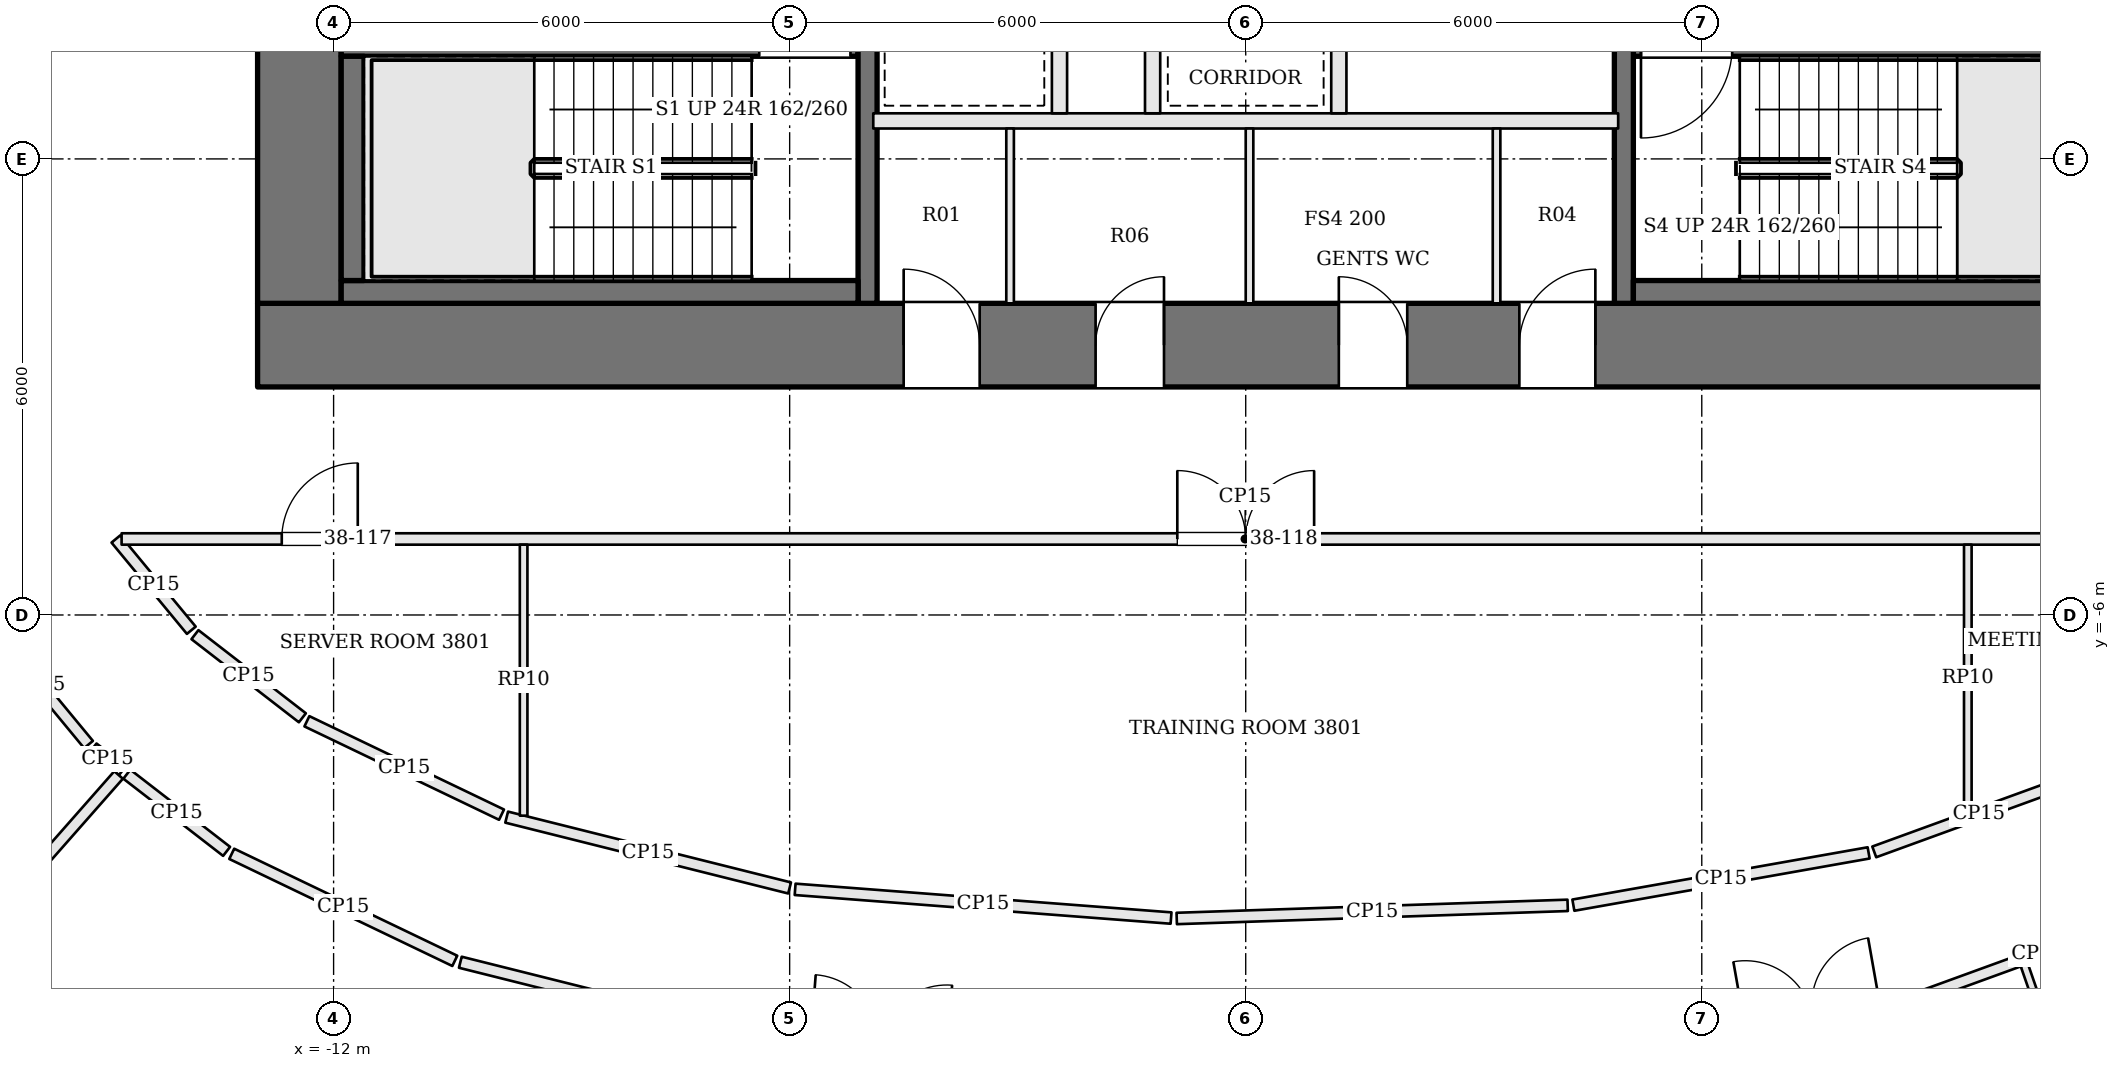
"""IFC4 building model, lengths in metres.
Left out: names, types, materials, properties, quantities, classifications, styles, units other than length and angle.
Written with IfcOpenShell. Run it as: python <this file> out.ifc"""

import sys

from ifc_helpers import new_model, si_unit, direction, frame, frame_2d, origin, place, context, subcontext, project, spatial, rectangle, extrude, element, fill, save


model = new_model("IFC4")
c1 = context("Model", 3, precision=1e-05, world=origin(), true_north=direction((0.0, 1.0)))
c2 = subcontext(c1, "Body", "Model", "MODEL_VIEW")
j1 = project(units=[si_unit("LENGTHUNIT", "METRE"), si_unit("PLANEANGLEUNIT", "RADIAN")], contexts=[c1])
p1 = place(None, origin())
s1 = spatial("IfcSite", under=j1, at=p1, CompositionType="ELEMENT")
p2 = place(p1, origin())
s2 = spatial("IfcBuilding", under=s1, at=p2, CompositionType="ELEMENT")
p3 = place(p2, frame((0.0, 0.0, 157.8)))
s3 = spatial("IfcBuildingStorey", under=s2, at=p3, CompositionType="ELEMENT", Elevation=157.8)
p4 = place(p3, frame((-13.0, -2.45, 0.0), z_axis=(0.0, 0.0, 1.0), x_axis=(1.0, 0.0, 0.0)))
e1 = element("IfcWall", 1, at=p4, inside=s3, PredefinedType="SHEAR", context=c2, shape_type="SweptSolid", body=[
    extrude(rectangle(XDim=26.0, YDim=1.1, at=frame_2d((13.0, 0.0))), origin(), (0.0, 0.0, 1.0), 3.9),
])
p5 = place(p4, frame((8.5, 0.0, 0.0)))
e2 = element("IfcOpeningElement", 2, at=p5, cuts=e1, PredefinedType="OPENING", context=c2, shape_type="SweptSolid", body=[
    extrude(rectangle(XDim=1.0, YDim=2.1, at=frame_2d((0.5, 1.05))), frame((0.0, 0.56, 0.0), z_axis=(0.0, -1.0, 0.0), x_axis=(1.0, 0.0, 0.0)), (0.0, 0.0, 1.0), 1.12),
])
p6 = place(p4, frame((11.025, 0.0, 0.0)))
e3 = element("IfcOpeningElement", 3, at=p6, cuts=e1, PredefinedType="OPENING", context=c2, shape_type="SweptSolid", body=[
    extrude(rectangle(XDim=0.9, YDim=2.1, at=frame_2d((0.45, 1.05))), frame((0.0, 0.56, 0.0), z_axis=(0.0, -1.0, 0.0), x_axis=(1.0, 0.0, 0.0)), (0.0, 0.0, 1.0), 1.12),
])
p7 = place(p4, frame((14.225, 0.0, 0.0)))
e4 = element("IfcOpeningElement", 4, at=p7, cuts=e1, PredefinedType="OPENING", context=c2, shape_type="SweptSolid", body=[
    extrude(rectangle(XDim=0.9, YDim=2.1, at=frame_2d((0.45, 1.05))), frame((0.0, 0.56, 0.0), z_axis=(0.0, -1.0, 0.0), x_axis=(1.0, 0.0, 0.0)), (0.0, 0.0, 1.0), 1.12),
])
p8 = place(p4, frame((16.6, 0.0, 0.0)))
e5 = element("IfcOpeningElement", 5, at=p8, cuts=e1, PredefinedType="OPENING", context=c2, shape_type="SweptSolid", body=[
    extrude(rectangle(XDim=1.0, YDim=2.1, at=frame_2d((0.5, 1.05))), frame((0.0, 0.56, 0.0), z_axis=(0.0, -1.0, 0.0), x_axis=(1.0, 0.0, 0.0)), (0.0, 0.0, 1.0), 1.12),
])
p9 = place(p3, frame((-12.45, -1.9, 0.0), z_axis=(0.0, 0.0, 1.0), x_axis=(0.0, 1.0, 0.0)))
e6 = element("IfcWall", 6, at=p9, inside=s3, PredefinedType="SHEAR", context=c2, shape_type="SweptSolid", body=[
    extrude(rectangle(XDim=12.8, YDim=1.1, at=frame_2d((6.4, 0.0))), origin(), (0.0, 0.0, 1.0), 3.9),
])
p10 = place(p9, frame((3.9, 0.0, 0.0)))
e7 = element("IfcOpeningElement", 7, at=p10, cuts=e6, PredefinedType="OPENING", context=c2, shape_type="SweptSolid", body=[
    extrude(rectangle(XDim=1.8, YDim=2.1, at=frame_2d((0.9, 1.05))), frame((0.0, 0.56, 0.0), z_axis=(0.0, -1.0, 0.0), x_axis=(1.0, 0.0, 0.0)), (0.0, 0.0, 1.0), 1.12),
])
p11 = place(p3, frame((-11.9, 1.475, 0.0), z_axis=(0.0, 0.0, 1.0), x_axis=(1.0, 0.0, 0.0)))
e8 = element("IfcWall", 8, at=p11, inside=s3, PredefinedType="SOLIDWALL", context=c2, shape_type="SweptSolid", body=[
    extrude(rectangle(XDim=6.8, YDim=0.25, at=frame_2d((3.4, 0.0))), origin(), (0.0, 0.0, 1.0), 3.7),
])
p12 = place(p11, frame((5.5, 0.0, 0.0)))
e9 = element("IfcOpeningElement", 9, at=p12, cuts=e8, PredefinedType="OPENING", context=c2, shape_type="SweptSolid", body=[
    extrude(rectangle(XDim=1.2, YDim=2.1, at=frame_2d((0.6, 1.05))), frame((0.0, 0.135, 0.0), z_axis=(0.0, -1.0, 0.0), x_axis=(1.0, 0.0, 0.0)), (0.0, 0.0, 1.0), 0.27),
])
p13 = place(p3, frame((11.9, 1.475, 0.0), z_axis=(0.0, 0.0, 1.0), x_axis=(-1.0, 0.0, 0.0)))
e10 = element("IfcWall", 10, at=p13, inside=s3, PredefinedType="SOLIDWALL", context=c2, shape_type="SweptSolid", body=[
    extrude(rectangle(XDim=6.8, YDim=0.25, at=frame_2d((3.4, 0.0))), origin(), (0.0, 0.0, 1.0), 3.7),
])
p14 = place(p13, frame((5.5, 0.0, 0.0)))
e11 = element("IfcOpeningElement", 11, at=p14, cuts=e10, PredefinedType="OPENING", context=c2, shape_type="SweptSolid", body=[
    extrude(rectangle(XDim=1.2, YDim=2.1, at=frame_2d((0.6, 1.05))), frame((0.0, 0.135, 0.0), z_axis=(0.0, -1.0, 0.0), x_axis=(1.0, 0.0, 0.0)), (0.0, 0.0, 1.0), 0.27),
])
p15 = place(p3, frame((-4.975, -1.9, 0.0), z_axis=(0.0, 0.0, 1.0), x_axis=(0.0, 1.0, 0.0)))
e12 = element("IfcWall", 12, at=p15, inside=s3, PredefinedType="SOLIDWALL", context=c2, shape_type="SweptSolid", body=[
    extrude(rectangle(XDim=12.8, YDim=0.25, at=frame_2d((6.4, 0.0))), origin(), (0.0, 0.0, 1.0), 3.7),
])
p16 = place(p15, frame((4.95, 0.0, 0.0)))
e13 = element("IfcOpeningElement", 13, at=p16, cuts=e12, PredefinedType="OPENING", context=c2, shape_type="SweptSolid", body=[
    extrude(rectangle(XDim=1.2, YDim=2.1, at=frame_2d((0.6, 1.05))), frame((0.0, 0.135, 0.0), z_axis=(0.0, -1.0, 0.0), x_axis=(1.0, 0.0, 0.0)), (0.0, 0.0, 1.0), 0.27),
])
p17 = place(p3, frame((4.975, 10.9, 0.0), z_axis=(0.0, 0.0, 1.0), x_axis=(0.0, -1.0, 0.0)))
e14 = element("IfcWall", 14, at=p17, inside=s3, PredefinedType="SOLIDWALL", context=c2, shape_type="SweptSolid", body=[
    extrude(rectangle(XDim=12.8, YDim=0.25, at=frame_2d((6.4, 0.0))), origin(), (0.0, 0.0, 1.0), 3.7),
])
p18 = place(p17, frame((4.95, 0.0, 0.0)))
e15 = element("IfcOpeningElement", 15, at=p18, cuts=e14, PredefinedType="OPENING", context=c2, shape_type="SweptSolid", body=[
    extrude(rectangle(XDim=1.2, YDim=2.1, at=frame_2d((0.6, 1.05))), frame((0.0, 0.135, 0.0), z_axis=(0.0, -1.0, 0.0), x_axis=(1.0, 0.0, 0.0)), (0.0, 0.0, 1.0), 0.27),
])
p19 = place(p3, frame((-11.9, -1.75, 0.0), z_axis=(0.0, 0.0, 1.0), x_axis=(1.0, 0.0, 0.0)))
e16 = element("IfcWall", 16, at=p19, inside=s3, PredefinedType="SOLIDWALL", context=c2, shape_type="SweptSolid", body=[
    extrude(rectangle(XDim=6.8, YDim=0.3, at=frame_2d((3.4, 0.0))), origin(), (0.0, 0.0, 1.0), 3.7),
])
p20 = place(p3, frame((-11.75, -1.6, 0.0), z_axis=(0.0, 0.0, 1.0), x_axis=(0.0, 1.0, 0.0)))
e17 = element("IfcWall", 17, at=p20, inside=s3, PredefinedType="SOLIDWALL", context=c2, shape_type="SweptSolid", body=[
    extrude(rectangle(XDim=2.95, YDim=0.3, at=frame_2d((1.475, 0.0))), origin(), (0.0, 0.0, 1.0), 3.7),
])
p21 = place(p3, frame((11.9, -1.75, 0.0), z_axis=(0.0, 0.0, 1.0), x_axis=(-1.0, 0.0, 0.0)))
e18 = element("IfcWall", 18, at=p21, inside=s3, PredefinedType="SOLIDWALL", context=c2, shape_type="SweptSolid", body=[
    extrude(rectangle(XDim=6.8, YDim=0.3, at=frame_2d((3.4, 0.0))), origin(), (0.0, 0.0, 1.0), 3.7),
])
p22 = place(p3, frame((-4.9, 0.5, 0.0), z_axis=(0.0, 0.0, 1.0), x_axis=(1.0, 0.0, 0.0)))
e19 = element("IfcWall", 19, at=p22, inside=s3, PredefinedType="SOLIDWALL", context=c2, shape_type="SweptSolid", body=[
    extrude(rectangle(XDim=9.8, YDim=0.2, at=frame_2d((4.9, 0.0))), origin(), (0.0, 0.0, 1.0), 3.7),
])
for number, where, z_axis, x_axis in (
    (20, (-2.45, 0.6, 0.0), (0.0, 0.0, 1.0), (0.0, 1.0, 0.0)),
    (21, (-1.225, 0.6, 0.0), (0.0, 0.0, 1.0), (0.0, 1.0, 0.0)),
    (22, (1.225, 0.6, 0.0), (0.0, 0.0, 1.0), (0.0, 1.0, 0.0)),
):
    element("IfcWall", number, at=place(p3, frame(where, z_axis=z_axis, x_axis=x_axis)), inside=s3, PredefinedType="SOLIDWALL", context=c2, shape_type="SweptSolid", body=[
        extrude(rectangle(XDim=2.2, YDim=0.2, at=frame_2d((1.1, 0.0))), origin(), (0.0, 0.0, 1.0), 3.7),
    ])
for number, where, z_axis, x_axis in (
    (23, (-3.1, -1.9, 0.0), (0.0, 0.0, 1.0), (0.0, 1.0, 0.0)),
    (24, (0.05, -1.9, 0.0), (0.0, 0.0, 1.0), (0.0, 1.0, 0.0)),
    (25, (3.3, -1.9, 0.0), (0.0, 0.0, 1.0), (0.0, 1.0, 0.0)),
):
    element("IfcWall", number, at=place(p3, frame(where, z_axis=z_axis, x_axis=x_axis)), inside=s3, PredefinedType="PARTITIONING", context=c2, shape_type="SweptSolid", body=[
        extrude(rectangle(XDim=2.3, YDim=0.1, at=frame_2d((1.15, 0.0))), origin(), (0.0, 0.0, 1.0), 3.7),
    ])
p23 = place(p3, frame((-16.523, -6.132, 0.0), z_axis=(0.0, 0.0, 1.0), x_axis=(0.636763898907, -0.771058841496, 0.0)))
e26 = element("IfcWall", 26, at=p23, inside=s3, PredefinedType="PARTITIONING", context=c2, shape_type="SweptSolid", body=[
    extrude(rectangle(XDim=2.04, YDim=0.15, at=frame_2d((1.02, 0.0))), origin(), (0.0, 0.0, 1.0), 3.198),
])
p24 = place(p3, frame((-15.165, -7.75, 0.0), z_axis=(0.0, 0.0, 1.0), x_axis=(0.791020679675, -0.611789411748, 0.0)))
e27 = element("IfcWall", 27, at=p24, inside=s3, PredefinedType="PARTITIONING", context=c2, shape_type="SweptSolid", body=[
    extrude(rectangle(XDim=0.488, YDim=0.15, at=frame_2d((0.244, 0.0))), origin(), (0.0, 0.0, 1.0), 3.198),
])
p25 = place(p3, frame((-21.033, -15.148, 0.0), z_axis=(0.0, 0.0, 1.0), x_axis=(0.660964985905, 0.750416742488, 0.0)))
e28 = element("IfcWall", 28, at=p25, inside=s3, PredefinedType="PARTITIONING", context=c2, shape_type="SweptSolid", body=[
    extrude(rectangle(XDim=9.386, YDim=0.15, at=frame_2d((4.693, 0.0))), origin(), (0.0, 0.0, 1.0), 3.234),
])
p26 = place(p3, frame((-14.72, -8.094, 0.0), z_axis=(0.0, 0.0, 1.0), x_axis=(0.790886808694, -0.611962462765, 0.0)))
e29 = element("IfcWall", 29, at=p26, inside=s3, PredefinedType="PARTITIONING", context=c2, shape_type="SweptSolid", body=[
    extrude(rectangle(XDim=1.659, YDim=0.15, at=frame_2d((0.83, 0.0))), origin(), (0.0, 0.0, 1.0), 3.198),
])
p27 = place(p3, frame((-13.34, -9.142, 0.0), z_axis=(0.0, 0.0, 1.0), x_axis=(0.901599124721, -0.432572558425, 0.0)))
e30 = element("IfcWall", 30, at=p27, inside=s3, PredefinedType="PARTITIONING", context=c2, shape_type="SweptSolid", body=[
    extrude(rectangle(XDim=3.255, YDim=0.15, at=frame_2d((1.627, 0.0))), origin(), (0.0, 0.0, 1.0), 3.198),
])
p28 = place(p3, frame((-10.333, -10.569, 0.0), z_axis=(0.0, 0.0, 1.0), x_axis=(0.970067398009, -0.242835836151, 0.0)))
e31 = element("IfcWall", 31, at=p28, inside=s3, PredefinedType="PARTITIONING", context=c2, shape_type="SweptSolid", body=[
    extrude(rectangle(XDim=4.209, YDim=0.15, at=frame_2d((2.105, 0.0))), origin(), (0.0, 0.0, 1.0), 3.198),
])
p29 = place(p3, frame((8.86, -11.03, 0.0), z_axis=(0.0, 0.0, 1.0), x_axis=(0.939685902536, 0.342038601001, 0.0)))
e32 = element("IfcWall", 32, at=p29, inside=s3, PredefinedType="PARTITIONING", context=c2, shape_type="SweptSolid", body=[
    extrude(rectangle(XDim=3.316, YDim=0.15, at=frame_2d((1.658, 0.0))), origin(), (0.0, 0.0, 1.0), 3.198),
])
p30 = place(p3, frame((11.021, -8.115, 0.0), z_axis=(0.0, 0.0, 1.0), x_axis=(-0.939683845313, -0.342044252778, 0.0)))
e33 = element("IfcWall", 33, at=p30, inside=s3, PredefinedType="PARTITIONING", context=c2, shape_type="SweptSolid", body=[
    extrude(rectangle(XDim=2.929, YDim=0.15, at=frame_2d((1.464, 0.0))), origin(), (0.0, 0.0, 1.0), 3.198),
])
p31 = place(p3, frame((8.195, -9.13, 0.0), z_axis=(0.0, 0.0, 1.0), x_axis=(-0.9846880937, -0.174325437403, 0.0)))
e34 = element("IfcWall", 34, at=p31, inside=s3, PredefinedType="PARTITIONING", context=c2, shape_type="SweptSolid", body=[
    extrude(rectangle(XDim=3.945, YDim=0.15, at=frame_2d((1.973, 0.0))), origin(), (0.0, 0.0, 1.0), 3.198),
])
p32 = place(p3, frame((4.236, -9.82, 0.0), z_axis=(0.0, 0.0, 1.0), x_axis=(-0.999435760561, -0.033588100749, 0.0)))
e35 = element("IfcWall", 35, at=p32, inside=s3, PredefinedType="PARTITIONING", context=c2, shape_type="SweptSolid", body=[
    extrude(rectangle(XDim=5.146, YDim=0.15, at=frame_2d((2.573, 0.0))), origin(), (0.0, 0.0, 1.0), 3.198),
])
p33 = place(p3, frame((-0.982, -9.987, 0.0), z_axis=(0.0, 0.0, 1.0), x_axis=(-0.997096607341, 0.07614693447, 0.0)))
e36 = element("IfcWall", 36, at=p33, inside=s3, PredefinedType="PARTITIONING", context=c2, shape_type="SweptSolid", body=[
    extrude(rectangle(XDim=4.96, YDim=0.15, at=frame_2d((2.48, 0.0))), origin(), (0.0, 0.0, 1.0), 3.198),
])
p34 = place(p3, frame((-6.001, -9.591, 0.0), z_axis=(0.0, 0.0, 1.0), x_axis=(-0.970063855769, 0.242849986061, 0.0)))
e37 = element("IfcWall", 37, at=p34, inside=s3, PredefinedType="PARTITIONING", context=c2, shape_type="SweptSolid", body=[
    extrude(rectangle(XDim=3.837, YDim=0.15, at=frame_2d((1.919, 0.0))), origin(), (0.0, 0.0, 1.0), 3.198),
])
p35 = place(p3, frame((-9.791, -8.627, 0.0), z_axis=(0.0, 0.0, 1.0), x_axis=(-0.901598165215, 0.432574558292, 0.0)))
e38 = element("IfcWall", 38, at=p35, inside=s3, PredefinedType="PARTITIONING", context=c2, shape_type="SweptSolid", body=[
    extrude(rectangle(XDim=2.84, YDim=0.15, at=frame_2d((1.42, 0.0))), origin(), (0.0, 0.0, 1.0), 3.198),
])
p36 = place(p3, frame((-12.411, -7.353, 0.0), z_axis=(0.0, 0.0, 1.0), x_axis=(-0.790894311556, 0.611952766109, 0.0)))
e39 = element("IfcWall", 39, at=p36, inside=s3, PredefinedType="PARTITIONING", context=c2, shape_type="SweptSolid", body=[
    extrude(rectangle(XDim=1.787, YDim=0.15, at=frame_2d((0.894, 0.0))), origin(), (0.0, 0.0, 1.0), 3.198),
])
p37 = place(p3, frame((-13.872, -6.201, 0.0), z_axis=(0.0, 0.0, 1.0), x_axis=(-0.636832838855, 0.771001903601, 0.0)))
e40 = element("IfcWall", 40, at=p37, inside=s3, PredefinedType="PARTITIONING", context=c2, shape_type="SweptSolid", body=[
    extrude(rectangle(XDim=1.558, YDim=0.15, at=frame_2d((0.779, 0.0))), origin(), (0.0, 0.0, 1.0), 3.198),
])
p38 = place(p3, frame((-14.789, -5.0, 0.0), z_axis=(0.0, 0.0, 1.0), x_axis=(1.0, 0.0, 0.0)))
e41 = element("IfcWall", 41, at=p38, inside=s3, PredefinedType="PARTITIONING", context=c2, shape_type="SweptSolid", body=[
    extrude(rectangle(XDim=29.562, YDim=0.15, at=frame_2d((14.781, 0.0))), origin(), (0.0, 0.0, 1.0), 3.198),
])
p39 = place(p38, frame((2.107, 0.0, 0.0)))
e42 = element("IfcOpeningElement", 42, at=p39, cuts=e41, PredefinedType="OPENING", context=c2, shape_type="SweptSolid", body=[
    extrude(rectangle(XDim=1.0, YDim=2.1, at=frame_2d((0.5, 1.05))), frame((0.0, 0.085, 0.0), z_axis=(0.0, -1.0, 0.0), x_axis=(1.0, 0.0, 0.0)), (0.0, 0.0, 1.0), 0.17),
])
p40 = place(p38, frame((13.889, 0.0, 0.0)))
e43 = element("IfcOpeningElement", 43, at=p40, cuts=e41, PredefinedType="OPENING", context=c2, shape_type="SweptSolid", body=[
    extrude(rectangle(XDim=1.8, YDim=2.1, at=frame_2d((0.9, 1.05))), frame((0.0, 0.085, 0.0), z_axis=(0.0, -1.0, 0.0), x_axis=(1.0, 0.0, 0.0)), (0.0, 0.0, 1.0), 0.17),
])
p41 = place(p38, frame((26.463, 0.0, 0.0)))
e44 = element("IfcOpeningElement", 44, at=p41, cuts=e41, PredefinedType="OPENING", context=c2, shape_type="SweptSolid", body=[
    extrude(rectangle(XDim=1.0, YDim=2.4, at=frame_2d((0.5, 1.2))), frame((0.0, 0.085, 0.0), z_axis=(0.0, -1.0, 0.0), x_axis=(1.0, 0.0, 0.0)), (0.0, 0.0, 1.0), 0.17),
])
p42 = place(p3, frame((10.244, -10.606, 0.0), z_axis=(0.0, 0.0, 1.0), x_axis=(0.327520147745, -0.944844194998, 0.0)))
e45 = element("IfcWall", 45, at=p42, inside=s3, PredefinedType="PARTITIONING", context=c2, shape_type="SweptSolid", body=[
    extrude(rectangle(XDim=3.275, YDim=0.1, at=frame_2d((1.638, 0.0))), origin(), (0.0, 0.0, 1.0), 3.184),
])
p43 = place(p3, frame((-9.5, -8.64, 0.0), z_axis=(0.0, 0.0, 1.0), x_axis=(0.0, 1.0, 0.0)))
e46 = element("IfcWall", 46, at=p43, inside=s3, PredefinedType="PARTITIONING", context=c2, shape_type="SweptSolid", body=[
    extrude(rectangle(XDim=3.565, YDim=0.1, at=frame_2d((1.783, 0.0))), origin(), (0.0, 0.0, 1.0), 3.184),
])
p44 = place(p3, frame((9.5, -8.594, 0.0), z_axis=(0.0, 0.0, 1.0), x_axis=(0.0, 1.0, 0.0)))
e47 = element("IfcWall", 47, at=p44, inside=s3, PredefinedType="PARTITIONING", context=c2, shape_type="SweptSolid", body=[
    extrude(rectangle(XDim=3.519, YDim=0.1, at=frame_2d((1.759, 0.0))), origin(), (0.0, 0.0, 1.0), 3.184),
])
p45 = place(p5, origin())
e48 = element("IfcDoor", 48, at=p45, inside=s3, OperationType="SINGLE_SWING_LEFT", PredefinedType="DOOR", context=c2, shape_type="SweptSolid", body=[
    extrude(rectangle(XDim=1.0, YDim=2.1, at=frame_2d((0.5, 1.05))), frame((0.0, 0.025, 0.0), z_axis=(0.0, -1.0, 0.0), x_axis=(1.0, 0.0, 0.0)), (0.0, 0.0, 1.0), 0.05),
])
fill(e2, e48)
p46 = place(p6, origin())
e49 = element("IfcDoor", 49, at=p46, inside=s3, OperationType="SINGLE_SWING_RIGHT", PredefinedType="DOOR", context=c2, shape_type="SweptSolid", body=[
    extrude(rectangle(XDim=0.9, YDim=2.1, at=frame_2d((0.45, 1.05))), frame((0.0, 0.025, 0.0), z_axis=(0.0, -1.0, 0.0), x_axis=(1.0, 0.0, 0.0)), (0.0, 0.0, 1.0), 0.05),
])
fill(e3, e49)
p47 = place(p7, origin())
e50 = element("IfcDoor", 50, at=p47, inside=s3, OperationType="SINGLE_SWING_LEFT", PredefinedType="DOOR", context=c2, shape_type="SweptSolid", body=[
    extrude(rectangle(XDim=0.9, YDim=2.1, at=frame_2d((0.45, 1.05))), frame((0.0, 0.025, 0.0), z_axis=(0.0, -1.0, 0.0), x_axis=(1.0, 0.0, 0.0)), (0.0, 0.0, 1.0), 0.05),
])
fill(e4, e50)
p48 = place(p8, origin())
e51 = element("IfcDoor", 51, at=p48, inside=s3, OperationType="SINGLE_SWING_RIGHT", PredefinedType="DOOR", context=c2, shape_type="SweptSolid", body=[
    extrude(rectangle(XDim=1.0, YDim=2.1, at=frame_2d((0.5, 1.05))), frame((0.0, 0.025, 0.0), z_axis=(0.0, -1.0, 0.0), x_axis=(1.0, 0.0, 0.0)), (0.0, 0.0, 1.0), 0.05),
])
fill(e5, e51)
p49 = place(p39, origin())
e52 = element("IfcDoor", 52, at=p49, inside=s3, OperationType="SINGLE_SWING_RIGHT", PredefinedType="DOOR", context=c2, shape_type="SweptSolid", body=[
    extrude(rectangle(XDim=1.0, YDim=2.1, at=frame_2d((0.5, 1.05))), frame((0.0, 0.025, 0.0), z_axis=(0.0, -1.0, 0.0), x_axis=(1.0, 0.0, 0.0)), (0.0, 0.0, 1.0), 0.05),
])
fill(e42, e52)
p50 = place(p40, origin())
e53 = element("IfcDoor", 53, at=p50, inside=s3, OperationType="DOUBLE_DOOR_SINGLE_SWING", PredefinedType="DOOR", context=c2, shape_type="SweptSolid", body=[
    extrude(rectangle(XDim=1.8, YDim=2.1, at=frame_2d((0.9, 1.05))), frame((0.0, 0.025, 0.0), z_axis=(0.0, -1.0, 0.0), x_axis=(1.0, 0.0, 0.0)), (0.0, 0.0, 1.0), 0.05),
])
fill(e43, e53)
save(model, sys.argv[1])
